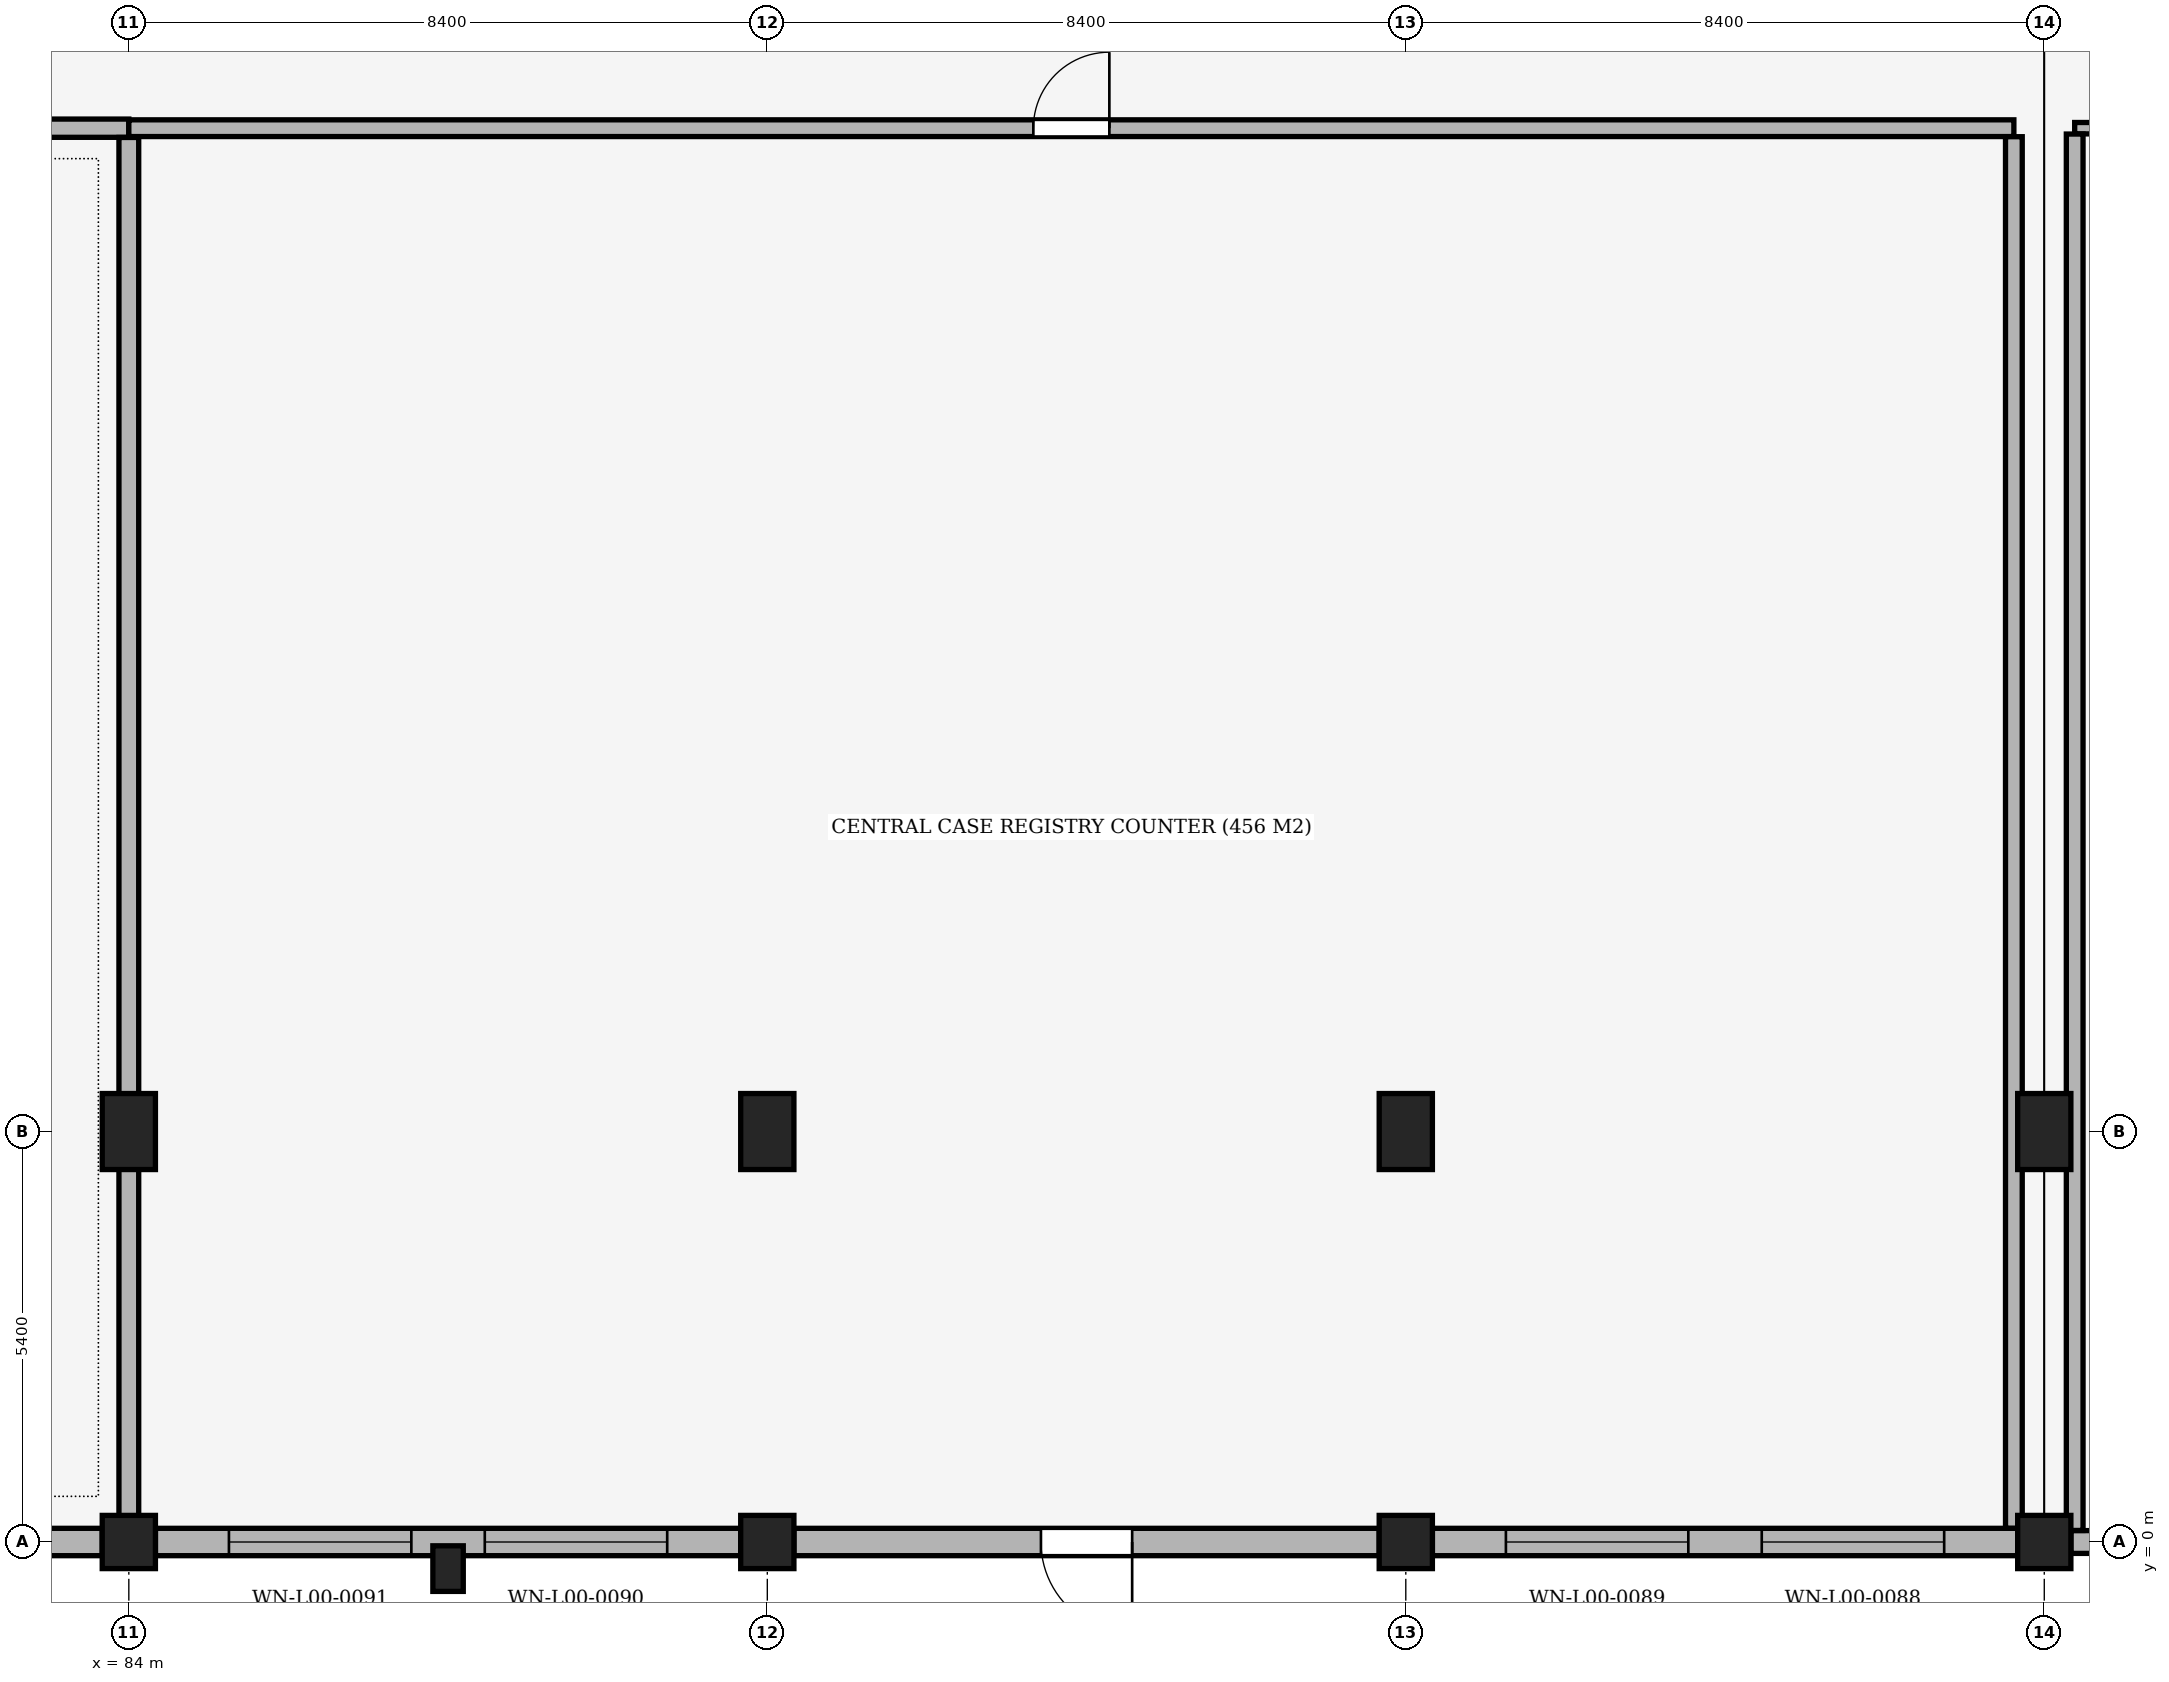
"""IFC4 building model, lengths in metres.
Left out: names, types, materials, properties, quantities, classifications, styles, units other than length and angle.
Written with IfcOpenShell. Run it as: python <this file> out.ifc"""

import sys

from ifc_helpers import new_model, si_unit, direction, frame, frame_2d, origin, origin_2d, place, context, subcontext, project, spatial, rectangle, extrude, element, fill, save


model = new_model("IFC4")
c1 = context("Model", 3, precision=1e-05, world=origin(), true_north=direction((0.0, 1.0)))
c2 = subcontext(c1, "Body", "Model", "MODEL_VIEW")
j1 = project(units=[si_unit("LENGTHUNIT", "METRE"), si_unit("PLANEANGLEUNIT", "RADIAN")], contexts=[c1])
p1 = place(None, origin())
s1 = spatial("IfcSite", under=j1, at=p1, CompositionType="ELEMENT")
p2 = place(p1, origin())
s2 = spatial("IfcBuilding", under=s1, at=p2, CompositionType="ELEMENT")
p3 = place(p2, origin())
s3 = spatial("IfcBuildingStorey", under=s2, at=p3, CompositionType="ELEMENT", Elevation=0.0)
p4 = place(p3, frame((84.0, 0.0, 0.0), z_axis=(0.0, 0.0, 1.0), x_axis=(1.0, 0.0, 0.0)))
e1 = element("IfcColumn", 1, at=p4, inside=s3, PredefinedType="COLUMN", context=c2, shape_type="SweptSolid", body=[
    extrude(rectangle(XDim=0.7, YDim=0.7, at=origin_2d()), origin(), (0.0, 0.0, 1.0), 5.1),
])
p5 = place(p3, frame((84.0, 5.4, 0.0), z_axis=(0.0, 0.0, 1.0), x_axis=(1.0, 0.0, 0.0)))
e2 = element("IfcColumn", 2, at=p5, inside=s3, PredefinedType="COLUMN", context=c2, shape_type="SweptSolid", body=[
    extrude(rectangle(XDim=0.7, YDim=1.0, at=origin_2d()), origin(), (0.0, 0.0, 1.0), 5.1),
])
p6 = place(p3, frame((92.4, 0.0, 0.0), z_axis=(0.0, 0.0, 1.0), x_axis=(1.0, 0.0, 0.0)))
e3 = element("IfcColumn", 3, at=p6, inside=s3, PredefinedType="COLUMN", context=c2, shape_type="SweptSolid", body=[
    extrude(rectangle(XDim=0.7, YDim=0.7, at=origin_2d()), origin(), (0.0, 0.0, 1.0), 5.1),
])
p7 = place(p3, frame((92.4, 5.4, 0.0), z_axis=(0.0, 0.0, 1.0), x_axis=(1.0, 0.0, 0.0)))
e4 = element("IfcColumn", 4, at=p7, inside=s3, PredefinedType="COLUMN", context=c2, shape_type="SweptSolid", body=[
    extrude(rectangle(XDim=0.7, YDim=1.0, at=origin_2d()), origin(), (0.0, 0.0, 1.0), 5.1),
])
p8 = place(p3, frame((100.8, 0.0, 0.0), z_axis=(0.0, 0.0, 1.0), x_axis=(1.0, 0.0, 0.0)))
e5 = element("IfcColumn", 5, at=p8, inside=s3, PredefinedType="COLUMN", context=c2, shape_type="SweptSolid", body=[
    extrude(rectangle(XDim=0.7, YDim=0.7, at=origin_2d()), origin(), (0.0, 0.0, 1.0), 5.1),
])
p9 = place(p3, frame((100.8, 5.4, 0.0), z_axis=(0.0, 0.0, 1.0), x_axis=(1.0, 0.0, 0.0)))
e6 = element("IfcColumn", 6, at=p9, inside=s3, PredefinedType="COLUMN", context=c2, shape_type="SweptSolid", body=[
    extrude(rectangle(XDim=0.7, YDim=1.0, at=origin_2d()), origin(), (0.0, 0.0, 1.0), 5.1),
])
p10 = place(p3, frame((109.2, 0.0, 0.0), z_axis=(0.0, 0.0, 1.0), x_axis=(1.0, 0.0, 0.0)))
e7 = element("IfcColumn", 7, at=p10, inside=s3, PredefinedType="COLUMN", context=c2, shape_type="SweptSolid", body=[
    extrude(rectangle(XDim=0.7, YDim=0.7, at=origin_2d()), origin(), (0.0, 0.0, 1.0), 5.1),
])
p11 = place(p3, frame((109.2, 5.4, 0.0), z_axis=(0.0, 0.0, 1.0), x_axis=(1.0, 0.0, 0.0)))
e8 = element("IfcColumn", 8, at=p11, inside=s3, PredefinedType="COLUMN", context=c2, shape_type="SweptSolid", body=[
    extrude(rectangle(XDim=0.7, YDim=1.0, at=origin_2d()), origin(), (0.0, 0.0, 1.0), 5.1),
])
p12 = place(p3, frame((88.2, -0.35, 0.0), z_axis=(0.0, 0.0, 1.0), x_axis=(1.0, 0.0, 0.0)))
e9 = element("IfcColumn", 9, at=p12, inside=s3, PredefinedType="PILASTER", context=c2, shape_type="SweptSolid", body=[
    extrude(rectangle(XDim=0.4, YDim=0.6, at=origin_2d()), origin(), (0.0, 0.0, 1.0), 5.1),
])
p13 = place(p3, frame((117.3, 0.0, 0.0), z_axis=(0.0, 0.0, 1.0), x_axis=(-1.0, 0.0, 0.0)))
e10 = element("IfcWall", 10, at=p13, inside=s3, PredefinedType="SOLIDWALL", context=c2, shape_type="SweptSolid", body=[
    extrude(rectangle(XDim=7.75, YDim=0.3, at=frame_2d((3.875, 0.0))), origin(), (0.0, 0.0, 1.0), 4.07),
])
p14 = place(p13, frame((1.65, 0.0, 0.85)))
e11 = element("IfcOpeningElement", 11, at=p14, cuts=e10, PredefinedType="OPENING", context=c2, shape_type="SweptSolid", body=[
    extrude(rectangle(XDim=1.4, YDim=2.4, at=frame_2d((0.7, 1.2))), frame((0.0, 0.165, 0.0), z_axis=(0.0, -1.0, 0.0), x_axis=(1.0, 0.0, 0.0)), (0.0, 0.0, 1.0), 0.33),
])
p15 = place(p13, frame((4.7, 0.0, 0.85)))
e12 = element("IfcOpeningElement", 12, at=p15, cuts=e10, PredefinedType="OPENING", context=c2, shape_type="SweptSolid", body=[
    extrude(rectangle(XDim=1.4, YDim=2.4, at=frame_2d((0.7, 1.2))), frame((0.0, 0.165, 0.0), z_axis=(0.0, -1.0, 0.0), x_axis=(1.0, 0.0, 0.0)), (0.0, 0.0, 1.0), 0.33),
])
p16 = place(p3, frame((108.85, 0.0, 0.0), z_axis=(0.0, 0.0, 1.0), x_axis=(-1.0, 0.0, 0.0)))
e13 = element("IfcWall", 13, at=p16, inside=s3, PredefinedType="SOLIDWALL", context=c2, shape_type="SweptSolid", body=[
    extrude(rectangle(XDim=7.7, YDim=0.36, at=frame_2d((3.85, 0.0))), origin(), (0.0, 0.0, 1.0), 4.07),
])
p17 = place(p16, frame((0.967, 0.0, 0.85)))
e14 = element("IfcOpeningElement", 14, at=p17, cuts=e13, PredefinedType="OPENING", context=c2, shape_type="SweptSolid", body=[
    extrude(rectangle(XDim=2.4, YDim=2.4, at=frame_2d((1.2, 1.2))), frame((0.0, 0.195, 0.0), z_axis=(0.0, -1.0, 0.0), x_axis=(1.0, 0.0, 0.0)), (0.0, 0.0, 1.0), 0.39),
])
p18 = place(p16, frame((4.333, 0.0, 0.85)))
e15 = element("IfcOpeningElement", 15, at=p18, cuts=e13, PredefinedType="OPENING", context=c2, shape_type="SweptSolid", body=[
    extrude(rectangle(XDim=2.4, YDim=2.4, at=frame_2d((1.2, 1.2))), frame((0.0, 0.195, 0.0), z_axis=(0.0, -1.0, 0.0), x_axis=(1.0, 0.0, 0.0)), (0.0, 0.0, 1.0), 0.39),
])
p19 = place(p3, frame((100.45, 0.0, 0.0), z_axis=(0.0, 0.0, 1.0), x_axis=(-1.0, 0.0, 0.0)))
e16 = element("IfcWall", 16, at=p19, inside=s3, PredefinedType="SOLIDWALL", context=c2, shape_type="SweptSolid", body=[
    extrude(rectangle(XDim=7.7, YDim=0.36, at=frame_2d((3.85, 0.0))), origin(), (0.0, 0.0, 1.0), 4.07),
])
p20 = place(p19, frame((3.25, 0.0, 0.0)))
e17 = element("IfcOpeningElement", 17, at=p20, cuts=e16, PredefinedType="OPENING", context=c2, shape_type="SweptSolid", body=[
    extrude(rectangle(XDim=1.2, YDim=2.2, at=frame_2d((0.6, 1.1))), frame((0.0, 0.195, 0.0), z_axis=(0.0, -1.0, 0.0), x_axis=(1.0, 0.0, 0.0)), (0.0, 0.0, 1.0), 0.39),
])
p21 = place(p3, frame((92.05, 0.0, 0.0), z_axis=(0.0, 0.0, 1.0), x_axis=(-1.0, 0.0, 0.0)))
e18 = element("IfcWall", 18, at=p21, inside=s3, PredefinedType="SOLIDWALL", context=c2, shape_type="SweptSolid", body=[
    extrude(rectangle(XDim=7.7, YDim=0.36, at=frame_2d((3.85, 0.0))), origin(), (0.0, 0.0, 1.0), 4.07),
])
p22 = place(p21, frame((0.967, 0.0, 0.85)))
e19 = element("IfcOpeningElement", 19, at=p22, cuts=e18, PredefinedType="OPENING", context=c2, shape_type="SweptSolid", body=[
    extrude(rectangle(XDim=2.4, YDim=2.4, at=frame_2d((1.2, 1.2))), frame((0.0, 0.195, 0.0), z_axis=(0.0, -1.0, 0.0), x_axis=(1.0, 0.0, 0.0)), (0.0, 0.0, 1.0), 0.39),
])
p23 = place(p21, frame((4.333, 0.0, 0.85)))
e20 = element("IfcOpeningElement", 20, at=p23, cuts=e18, PredefinedType="OPENING", context=c2, shape_type="SweptSolid", body=[
    extrude(rectangle(XDim=2.4, YDim=2.4, at=frame_2d((1.2, 1.2))), frame((0.0, 0.195, 0.0), z_axis=(0.0, -1.0, 0.0), x_axis=(1.0, 0.0, 0.0)), (0.0, 0.0, 1.0), 0.39),
])
p24 = place(p3, frame((83.65, 0.0, 0.0), z_axis=(0.0, 0.0, 1.0), x_axis=(-1.0, 0.0, 0.0)))
e21 = element("IfcWall", 21, at=p24, inside=s3, PredefinedType="SOLIDWALL", context=c2, shape_type="SweptSolid", body=[
    extrude(rectangle(XDim=7.7, YDim=0.36, at=frame_2d((3.85, 0.0))), origin(), (0.0, 0.0, 1.0), 4.07),
])
p25 = place(p24, frame((0.967, 0.0, 0.85)))
e22 = element("IfcOpeningElement", 22, at=p25, cuts=e21, PredefinedType="OPENING", context=c2, shape_type="SweptSolid", body=[
    extrude(rectangle(XDim=2.4, YDim=2.4, at=frame_2d((1.2, 1.2))), frame((0.0, 0.195, 0.0), z_axis=(0.0, -1.0, 0.0), x_axis=(1.0, 0.0, 0.0)), (0.0, 0.0, 1.0), 0.39),
])
p26 = place(p24, frame((4.333, 0.0, 0.85)))
e23 = element("IfcOpeningElement", 23, at=p26, cuts=e21, PredefinedType="OPENING", context=c2, shape_type="SweptSolid", body=[
    extrude(rectangle(XDim=2.4, YDim=2.4, at=frame_2d((1.2, 1.2))), frame((0.0, 0.195, 0.0), z_axis=(0.0, -1.0, 0.0), x_axis=(1.0, 0.0, 0.0)), (0.0, 0.0, 1.0), 0.39),
])
p27 = place(p3, frame((70.2, 18.6, 0.0), z_axis=(0.0, 0.0, 1.0), x_axis=(1.0, 0.0, 0.0)))
e24 = element("IfcWall", 24, at=p27, inside=s3, PredefinedType="PARTITIONING", context=c2, shape_type="SweptSolid", body=[
    extrude(rectangle(XDim=13.8, YDim=0.24, at=frame_2d((6.9, 0.0))), origin(), (0.0, 0.0, 1.0), 3.67),
])
p28 = place(p3, frame((84.0, 18.6, 0.0), z_axis=(0.0, 0.0, 1.0), x_axis=(1.0, 0.0, 0.0)))
e25 = element("IfcWall", 25, at=p28, inside=s3, PredefinedType="PARTITIONING", context=c2, shape_type="SweptSolid", body=[
    extrude(rectangle(XDim=24.8, YDim=0.22, at=frame_2d((12.4, 0.0))), origin(), (0.0, 0.0, 1.0), 3.67),
])
p29 = place(p28, frame((11.9, 0.0, 0.0)))
e26 = element("IfcOpeningElement", 26, at=p29, cuts=e25, PredefinedType="OPENING", context=c2, shape_type="SweptSolid", body=[
    extrude(rectangle(XDim=1.0, YDim=2.2, at=frame_2d((0.5, 1.1))), frame((0.0, 0.125, 0.0), z_axis=(0.0, -1.0, 0.0), x_axis=(1.0, 0.0, 0.0)), (0.0, 0.0, 1.0), 0.25),
])
p30 = place(p3, frame((109.6, 18.6, 0.0), z_axis=(0.0, 0.0, 1.0), x_axis=(1.0, 0.0, 0.0)))
e27 = element("IfcWall", 27, at=p30, inside=s3, PredefinedType="PARTITIONING", context=c2, shape_type="SweptSolid", body=[
    extrude(rectangle(XDim=8.4, YDim=0.15, at=frame_2d((4.2, 0.0))), origin(), (0.0, 0.0, 1.0), 3.67),
])
p31 = place(p3, frame((84.0, -0.028, 0.0), z_axis=(0.0, 0.0, 1.0), x_axis=(0.0, 1.0, 0.0)))
e28 = element("IfcWall", 28, at=p31, inside=s3, PredefinedType="PARTITIONING", context=c2, shape_type="SweptSolid", body=[
    extrude(rectangle(XDim=18.506, YDim=0.26, at=frame_2d((9.253, 0.0))), origin(), (0.0, 0.0, 1.0), 3.67),
])
p32 = place(p3, frame((108.8, 0.182, 0.0), z_axis=(0.0, 0.0, 1.0), x_axis=(0.0, 1.0, 0.0)))
e29 = element("IfcWall", 29, at=p32, inside=s3, PredefinedType="PARTITIONING", context=c2, shape_type="SweptSolid", body=[
    extrude(rectangle(XDim=18.306, YDim=0.22, at=frame_2d((9.153, 0.0))), origin(), (0.0, 0.0, 1.0), 3.67),
])
p33 = place(p3, frame((109.6, 0.152, 0.0), z_axis=(0.0, 0.0, 1.0), x_axis=(0.0, 1.0, 0.0)))
e30 = element("IfcWall", 30, at=p33, inside=s3, PredefinedType="PARTITIONING", context=c2, shape_type="SweptSolid", body=[
    extrude(rectangle(XDim=18.371, YDim=0.22, at=frame_2d((9.186, 0.0))), origin(), (0.0, 0.0, 1.0), 3.67),
])
p34 = place(p17, origin())
e31 = element("IfcWindow", 31, at=p34, inside=s3, PartitioningType="SINGLE_PANEL", PredefinedType="WINDOW", context=c2, shape_type="SweptSolid", body=[
    extrude(rectangle(XDim=2.4, YDim=2.4, at=frame_2d((1.2, 1.2))), frame((0.0, 0.03, 0.0), z_axis=(0.0, -1.0, 0.0), x_axis=(1.0, 0.0, 0.0)), (0.0, 0.0, 1.0), 0.06),
])
fill(e14, e31)
p35 = place(p18, origin())
e32 = element("IfcWindow", 32, at=p35, inside=s3, PartitioningType="SINGLE_PANEL", PredefinedType="WINDOW", context=c2, shape_type="SweptSolid", body=[
    extrude(rectangle(XDim=2.4, YDim=2.4, at=frame_2d((1.2, 1.2))), frame((0.0, 0.03, 0.0), z_axis=(0.0, -1.0, 0.0), x_axis=(1.0, 0.0, 0.0)), (0.0, 0.0, 1.0), 0.06),
])
fill(e15, e32)
p36 = place(p20, origin())
e33 = element("IfcDoor", 33, at=p36, inside=s3, OperationType="SINGLE_SWING_LEFT", PredefinedType="DOOR", context=c2, shape_type="SweptSolid", body=[
    extrude(rectangle(XDim=1.2, YDim=2.2, at=frame_2d((0.6, 1.1))), frame((0.0, 0.025, 0.0), z_axis=(0.0, -1.0, 0.0), x_axis=(1.0, 0.0, 0.0)), (0.0, 0.0, 1.0), 0.05),
])
fill(e17, e33)
p37 = place(p22, origin())
e34 = element("IfcWindow", 34, at=p37, inside=s3, PartitioningType="SINGLE_PANEL", PredefinedType="WINDOW", context=c2, shape_type="SweptSolid", body=[
    extrude(rectangle(XDim=2.4, YDim=2.4, at=frame_2d((1.2, 1.2))), frame((0.0, 0.03, 0.0), z_axis=(0.0, -1.0, 0.0), x_axis=(1.0, 0.0, 0.0)), (0.0, 0.0, 1.0), 0.06),
])
fill(e19, e34)
p38 = place(p23, origin())
e35 = element("IfcWindow", 35, at=p38, inside=s3, PartitioningType="SINGLE_PANEL", PredefinedType="WINDOW", context=c2, shape_type="SweptSolid", body=[
    extrude(rectangle(XDim=2.4, YDim=2.4, at=frame_2d((1.2, 1.2))), frame((0.0, 0.03, 0.0), z_axis=(0.0, -1.0, 0.0), x_axis=(1.0, 0.0, 0.0)), (0.0, 0.0, 1.0), 0.06),
])
fill(e20, e35)
p39 = place(p29, origin())
e36 = element("IfcDoor", 36, at=p39, inside=s3, OperationType="SINGLE_SWING_RIGHT", PredefinedType="DOOR", context=c2, shape_type="SweptSolid", body=[
    extrude(rectangle(XDim=1.0, YDim=2.2, at=frame_2d((0.5, 1.1))), frame((0.0, 0.025, 0.0), z_axis=(0.0, -1.0, 0.0), x_axis=(1.0, 0.0, 0.0)), (0.0, 0.0, 1.0), 0.05),
])
fill(e26, e36)
save(model, sys.argv[1])
